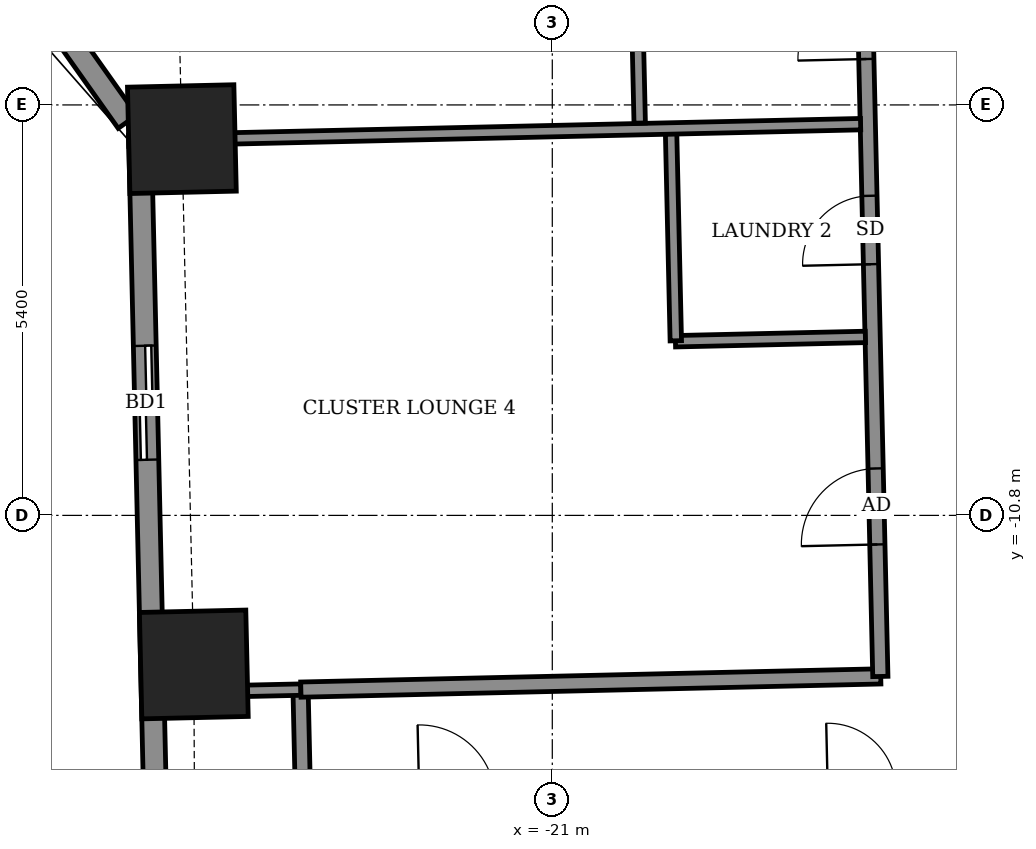
"""IFC4 building model, lengths in metres.
Left out: names, types, materials, properties, quantities, classifications, styles, units other than length and angle.
Written with IfcOpenShell. Run it as: python <this file> out.ifc"""

import sys

from ifc_helpers import new_model, si_unit, direction, frame, frame_2d, origin, origin_2d, place, context, subcontext, project, spatial, rectangle, extrude, element, fill, save


model = new_model("IFC4")
c1 = context("Model", 3, precision=1e-05, world=origin(), true_north=direction((0.0, 1.0)))
c2 = subcontext(c1, "Body", "Model", "MODEL_VIEW")
j1 = project(units=[si_unit("LENGTHUNIT", "METRE"), si_unit("PLANEANGLEUNIT", "RADIAN")], contexts=[c1])
p1 = place(None, origin())
s1 = spatial("IfcSite", under=j1, at=p1, CompositionType="ELEMENT")
p2 = place(p1, origin())
s2 = spatial("IfcBuilding", under=s1, at=p2, CompositionType="ELEMENT")
p3 = place(p2, frame((0.0, 0.0, 93.7)))
s3 = spatial("IfcBuildingStorey", under=s2, at=p3, CompositionType="ELEMENT", Elevation=93.7)
for number, where, z_axis, x_axis in (
    (1, (-25.873, -5.85, -0.55), (0.0, 0.0, 1.0), (0.023, -1.0, 0.0)),
    (2, (-25.716, -12.761, -0.55), (0.0, 0.0, 1.0), (0.023, -1.0, 0.0)),
):
    element("IfcColumn", number, at=place(p3, frame(where, z_axis=z_axis, x_axis=x_axis)), inside=s3, PredefinedType="COLUMN", context=c2, shape_type="SweptSolid", body=[
        extrude(rectangle(XDim=1.4, YDim=1.4, at=origin_2d()), origin(), (0.0, 0.0, 1.0), 3.6),
    ])
p4 = place(p3, frame((-28.651, -2.71, 0.0), z_axis=(0.0, 0.0, 1.0), x_axis=(0.577964171051, -0.816062140392, 0.0)))
e3 = element("IfcWall", 3, at=p4, inside=s3, PredefinedType="SOLIDWALL", context=c2, shape_type="SweptSolid", body=[
    extrude(rectangle(XDim=3.567, YDim=0.3, at=frame_2d((1.784, 0.0))), origin(), (0.0, 0.0, 1.0), 3.05),
])
p5 = place(p4, frame((0.337, 0.0, 0.9)))
e4 = element("IfcOpeningElement", 4, at=p5, cuts=e3, PredefinedType="OPENING", context=c2, shape_type="SweptSolid", body=[
    extrude(rectangle(XDim=1.2, YDim=1.5, at=frame_2d((0.6, 0.75))), frame((0.0, 0.16, 0.0), z_axis=(0.0, -1.0, 0.0), x_axis=(1.0, 0.0, 0.0)), (0.0, 0.0, 1.0), 0.32),
])
p6 = place(p3, frame((-26.424, -5.808, 0.0), z_axis=(0.0, 0.0, 1.0), x_axis=(0.022654755793, -0.999743348085, 0.0)))
e5 = element("IfcWall", 5, at=p6, inside=s3, PredefinedType="SOLIDWALL", context=c2, shape_type="SweptSolid", body=[
    extrude(rectangle(XDim=13.729, YDim=0.3, at=frame_2d((6.865, 0.0))), origin(), (0.0, 0.0, 1.0), 3.05),
])
p7 = place(p6, frame((2.761, 0.0, 0.0)))
e6 = element("IfcOpeningElement", 6, at=p7, cuts=e5, PredefinedType="OPENING", context=c2, shape_type="SweptSolid", body=[
    extrude(rectangle(XDim=1.5, YDim=2.4, at=frame_2d((0.75, 1.2))), frame((0.0, 0.16, 0.0), z_axis=(0.0, -1.0, 0.0), x_axis=(1.0, 0.0, 0.0)), (0.0, 0.0, 1.0), 0.32),
])
p8 = place(p6, frame((8.894, 0.0, 0.9)))
e7 = element("IfcOpeningElement", 7, at=p8, cuts=e5, PredefinedType="OPENING", context=c2, shape_type="SweptSolid", body=[
    extrude(rectangle(XDim=2.4, YDim=1.5, at=frame_2d((1.2, 0.75))), frame((0.0, 0.16, 0.0), z_axis=(0.0, -1.0, 0.0), x_axis=(1.0, 0.0, 0.0)), (0.0, 0.0, 1.0), 0.32),
])
p9 = place(p3, frame((-24.278, -14.591, 0.0), z_axis=(0.0, 0.0, 1.0), x_axis=(-0.022632637625, 0.99974384905, 0.0)))
e8 = element("IfcWall", 8, at=p9, inside=s3, PredefinedType="PARTITIONING", context=c2, shape_type="SweptSolid", body=[
    extrude(rectangle(XDim=1.5, YDim=0.2, at=frame_2d((0.75, 0.0))), origin(), (0.0, 0.0, 1.0), 3.05),
])
p10 = place(p3, frame((-24.274, -14.591, 0.0), z_axis=(0.0, 0.0, 1.0), x_axis=(0.999742718753, 0.022682510909, 0.0)))
e9 = element("IfcWall", 9, at=p10, inside=s3, PredefinedType="PARTITIONING", context=c2, shape_type="SweptSolid", body=[
    extrude(rectangle(XDim=52.471, YDim=0.2, at=frame_2d((26.236, 0.0))), origin(), (0.0, 0.0, 1.0), 3.05),
])
p11 = place(p10, frame((1.525, 0.0, 0.0)))
e10 = element("IfcOpeningElement", 10, at=p11, cuts=e9, PredefinedType="OPENING", context=c2, shape_type="SweptSolid", body=[
    extrude(rectangle(XDim=1.0, YDim=2.1, at=frame_2d((0.5, 1.05))), frame((0.0, 0.11, 0.0), z_axis=(0.0, -1.0, 0.0), x_axis=(1.0, 0.0, 0.0)), (0.0, 0.0, 1.0), 0.22),
])
p12 = place(p10, frame((6.9, 0.0, 0.0)))
e11 = element("IfcOpeningElement", 11, at=p12, cuts=e9, PredefinedType="OPENING", context=c2, shape_type="SweptSolid", body=[
    extrude(rectangle(XDim=0.9, YDim=2.1, at=frame_2d((0.45, 1.05))), frame((0.0, 0.11, 0.0), z_axis=(0.0, -1.0, 0.0), x_axis=(1.0, 0.0, 0.0)), (0.0, 0.0, 1.0), 0.22),
])
p13 = place(p10, frame((11.575, 0.0, 0.0)))
e12 = element("IfcOpeningElement", 12, at=p13, cuts=e9, PredefinedType="OPENING", context=c2, shape_type="SweptSolid", body=[
    extrude(rectangle(XDim=0.9, YDim=2.1, at=frame_2d((0.45, 1.05))), frame((0.0, 0.11, 0.0), z_axis=(0.0, -1.0, 0.0), x_axis=(1.0, 0.0, 0.0)), (0.0, 0.0, 1.0), 0.22),
])
p14 = place(p10, frame((13.6, 0.0, 0.0)))
e13 = element("IfcOpeningElement", 13, at=p14, cuts=e9, PredefinedType="OPENING", context=c2, shape_type="SweptSolid", body=[
    extrude(rectangle(XDim=0.9, YDim=2.1, at=frame_2d((0.45, 1.05))), frame((0.0, 0.11, 0.0), z_axis=(0.0, -1.0, 0.0), x_axis=(1.0, 0.0, 0.0)), (0.0, 0.0, 1.0), 0.22),
])
p15 = place(p10, frame((20.45, 0.0, 0.0)))
e14 = element("IfcOpeningElement", 14, at=p15, cuts=e9, PredefinedType="OPENING", context=c2, shape_type="SweptSolid", body=[
    extrude(rectangle(XDim=0.9, YDim=2.1, at=frame_2d((0.45, 1.05))), frame((0.0, 0.11, 0.0), z_axis=(0.0, -1.0, 0.0), x_axis=(1.0, 0.0, 0.0)), (0.0, 0.0, 1.0), 0.22),
])
p16 = place(p10, frame((22.6, 0.0, 0.0)))
e15 = element("IfcOpeningElement", 15, at=p16, cuts=e9, PredefinedType="OPENING", context=c2, shape_type="SweptSolid", body=[
    extrude(rectangle(XDim=0.9, YDim=2.1, at=frame_2d((0.45, 1.05))), frame((0.0, 0.11, 0.0), z_axis=(0.0, -1.0, 0.0), x_axis=(1.0, 0.0, 0.0)), (0.0, 0.0, 1.0), 0.22),
])
p17 = place(p10, frame((29.475, 0.0, 0.0)))
e16 = element("IfcOpeningElement", 16, at=p17, cuts=e9, PredefinedType="OPENING", context=c2, shape_type="SweptSolid", body=[
    extrude(rectangle(XDim=0.9, YDim=2.1, at=frame_2d((0.45, 1.05))), frame((0.0, 0.11, 0.0), z_axis=(0.0, -1.0, 0.0), x_axis=(1.0, 0.0, 0.0)), (0.0, 0.0, 1.0), 0.22),
])
p18 = place(p10, frame((31.675, 0.0, 0.0)))
e17 = element("IfcOpeningElement", 17, at=p18, cuts=e9, PredefinedType="OPENING", context=c2, shape_type="SweptSolid", body=[
    extrude(rectangle(XDim=0.9, YDim=2.1, at=frame_2d((0.45, 1.05))), frame((0.0, 0.11, 0.0), z_axis=(0.0, -1.0, 0.0), x_axis=(1.0, 0.0, 0.0)), (0.0, 0.0, 1.0), 0.22),
])
p19 = place(p10, frame((38.675, 0.0, 0.0)))
e18 = element("IfcOpeningElement", 18, at=p19, cuts=e9, PredefinedType="OPENING", context=c2, shape_type="SweptSolid", body=[
    extrude(rectangle(XDim=0.9, YDim=2.1, at=frame_2d((0.45, 1.05))), frame((0.0, 0.11, 0.0), z_axis=(0.0, -1.0, 0.0), x_axis=(1.0, 0.0, 0.0)), (0.0, 0.0, 1.0), 0.22),
])
p20 = place(p10, frame((40.675, 0.0, 0.0)))
e19 = element("IfcOpeningElement", 19, at=p20, cuts=e9, PredefinedType="OPENING", context=c2, shape_type="SweptSolid", body=[
    extrude(rectangle(XDim=0.9, YDim=2.1, at=frame_2d((0.45, 1.05))), frame((0.0, 0.11, 0.0), z_axis=(0.0, -1.0, 0.0), x_axis=(1.0, 0.0, 0.0)), (0.0, 0.0, 1.0), 0.22),
])
p21 = place(p10, frame((50.436, 0.0, 0.0)))
e20 = element("IfcOpeningElement", 20, at=p21, cuts=e9, PredefinedType="OPENING", context=c2, shape_type="SweptSolid", body=[
    extrude(rectangle(XDim=1.0, YDim=2.1, at=frame_2d((0.5, 1.05))), frame((0.0, 0.11, 0.0), z_axis=(0.0, -1.0, 0.0), x_axis=(1.0, 0.0, 0.0)), (0.0, 0.0, 1.0), 0.22),
])
p22 = place(p10, frame((45.45, 0.0, 0.0)))
e21 = element("IfcOpeningElement", 21, at=p22, cuts=e9, PredefinedType="OPENING", context=c2, shape_type="SweptSolid", body=[
    extrude(rectangle(XDim=0.9, YDim=2.1, at=frame_2d((0.45, 1.05))), frame((0.0, 0.11, 0.0), z_axis=(0.0, -1.0, 0.0), x_axis=(1.0, 0.0, 0.0)), (0.0, 0.0, 1.0), 0.22),
])
p23 = place(p3, frame((-26.108, -13.132, 0.0), z_axis=(0.0, 0.0, 1.0), x_axis=(0.999752642043, 0.022240834685, 0.0)))
e22 = element("IfcWall", 22, at=p23, inside=s3, PredefinedType="PARTITIONING", context=c2, shape_type="SweptSolid", body=[
    extrude(rectangle(XDim=1.8, YDim=0.15, at=frame_2d((0.9, 0.0))), origin(), (0.0, 0.0, 1.0), 3.05),
])
p24 = place(p3, frame((-24.308, -13.092, 0.0), z_axis=(0.0, 0.0, 1.0), x_axis=(0.999739800004, 0.022810793222, 0.0)))
e23 = element("IfcWall", 23, at=p24, inside=s3, PredefinedType="PARTITIONING", context=c2, shape_type="SweptSolid", body=[
    extrude(rectangle(XDim=7.631, YDim=0.2, at=frame_2d((3.815, 0.0))), origin(), (0.0, 0.0, 1.0), 3.05),
])
p25 = place(p3, frame((-16.684, -12.919, 0.0), z_axis=(0.0, 0.0, 1.0), x_axis=(-0.022706151961, 0.999742182097, 0.0)))
e24 = element("IfcWall", 24, at=p25, inside=s3, PredefinedType="PARTITIONING", context=c2, shape_type="SweptSolid", body=[
    extrude(rectangle(XDim=25.45, YDim=0.2, at=frame_2d((12.725, 0.0))), origin(), (0.0, 0.0, 1.0), 3.05),
])
p26 = place(p25, frame((23.938, 0.0, 0.0)))
e25 = element("IfcOpeningElement", 25, at=p26, cuts=e24, PredefinedType="OPENING", context=c2, shape_type="SweptSolid", body=[
    extrude(rectangle(XDim=1.0, YDim=2.1, at=frame_2d((0.5, 1.05))), frame((0.0, 0.11, 0.0), z_axis=(0.0, -1.0, 0.0), x_axis=(1.0, 0.0, 0.0)), (0.0, 0.0, 1.0), 0.22),
])
p27 = place(p25, frame((21.775, 0.0, 0.0)))
e26 = element("IfcOpeningElement", 26, at=p27, cuts=e24, PredefinedType="OPENING", context=c2, shape_type="SweptSolid", body=[
    extrude(rectangle(XDim=0.9, YDim=2.1, at=frame_2d((0.45, 1.05))), frame((0.0, 0.11, 0.0), z_axis=(0.0, -1.0, 0.0), x_axis=(1.0, 0.0, 0.0)), (0.0, 0.0, 1.0), 0.22),
])
p28 = place(p25, frame((16.975, 0.0, 0.0)))
e27 = element("IfcOpeningElement", 27, at=p28, cuts=e24, PredefinedType="OPENING", context=c2, shape_type="SweptSolid", body=[
    extrude(rectangle(XDim=1.0, YDim=2.1, at=frame_2d((0.5, 1.05))), frame((0.0, 0.11, 0.0), z_axis=(0.0, -1.0, 0.0), x_axis=(1.0, 0.0, 0.0)), (0.0, 0.0, 1.0), 0.22),
])
p29 = place(p25, frame((19.275, 0.0, 0.0)))
e28 = element("IfcOpeningElement", 28, at=p29, cuts=e24, PredefinedType="OPENING", context=c2, shape_type="SweptSolid", body=[
    extrude(rectangle(XDim=0.9, YDim=2.1, at=frame_2d((0.45, 1.05))), frame((0.0, 0.11, 0.0), z_axis=(0.0, -1.0, 0.0), x_axis=(1.0, 0.0, 0.0)), (0.0, 0.0, 1.0), 0.22),
])
p30 = place(p25, frame((15.075, 0.0, 0.0)))
e29 = element("IfcOpeningElement", 29, at=p30, cuts=e24, PredefinedType="OPENING", context=c2, shape_type="SweptSolid", body=[
    extrude(rectangle(XDim=1.0, YDim=2.1, at=frame_2d((0.5, 1.05))), frame((0.0, 0.11, 0.0), z_axis=(0.0, -1.0, 0.0), x_axis=(1.0, 0.0, 0.0)), (0.0, 0.0, 1.0), 0.22),
])
p31 = place(p25, frame((12.975, 0.0, 0.0)))
e30 = element("IfcOpeningElement", 30, at=p31, cuts=e24, PredefinedType="OPENING", context=c2, shape_type="SweptSolid", body=[
    extrude(rectangle(XDim=0.9, YDim=2.1, at=frame_2d((0.45, 1.05))), frame((0.0, 0.11, 0.0), z_axis=(0.0, -1.0, 0.0), x_axis=(1.0, 0.0, 0.0)), (0.0, 0.0, 1.0), 0.22),
])
p32 = place(p25, frame((10.55, 0.0, 0.0)))
e31 = element("IfcOpeningElement", 31, at=p32, cuts=e24, PredefinedType="OPENING", context=c2, shape_type="SweptSolid", body=[
    extrude(rectangle(XDim=1.0, YDim=2.1, at=frame_2d((0.5, 1.05))), frame((0.0, 0.11, 0.0), z_axis=(0.0, -1.0, 0.0), x_axis=(1.0, 0.0, 0.0)), (0.0, 0.0, 1.0), 0.22),
])
p33 = place(p25, frame((8.125, 0.0, 0.0)))
e32 = element("IfcOpeningElement", 32, at=p33, cuts=e24, PredefinedType="OPENING", context=c2, shape_type="SweptSolid", body=[
    extrude(rectangle(XDim=0.9, YDim=2.1, at=frame_2d((0.45, 1.05))), frame((0.0, 0.11, 0.0), z_axis=(0.0, -1.0, 0.0), x_axis=(1.0, 0.0, 0.0)), (0.0, 0.0, 1.0), 0.22),
])
p34 = place(p25, frame((1.737, 0.0, 0.0)))
e33 = element("IfcOpeningElement", 33, at=p34, cuts=e24, PredefinedType="OPENING", context=c2, shape_type="SweptSolid", body=[
    extrude(rectangle(XDim=1.0, YDim=2.1, at=frame_2d((0.5, 1.05))), frame((0.0, 0.11, 0.0), z_axis=(0.0, -1.0, 0.0), x_axis=(1.0, 0.0, 0.0)), (0.0, 0.0, 1.0), 0.22),
])
p35 = place(p25, frame((5.425, 0.0, 0.0)))
e34 = element("IfcOpeningElement", 34, at=p35, cuts=e24, PredefinedType="OPENING", context=c2, shape_type="SweptSolid", body=[
    extrude(rectangle(XDim=0.9, YDim=2.1, at=frame_2d((0.45, 1.05))), frame((0.0, 0.11, 0.0), z_axis=(0.0, -1.0, 0.0), x_axis=(1.0, 0.0, 0.0)), (0.0, 0.0, 1.0), 0.22),
])
p36 = place(p3, frame((-19.38, -8.509, 0.0), z_axis=(0.0, 0.0, 1.0), x_axis=(0.999738750294, 0.02285675306, 0.0)))
e35 = element("IfcWall", 35, at=p36, inside=s3, PredefinedType="PARTITIONING", context=c2, shape_type="SweptSolid", body=[
    extrude(rectangle(XDim=2.5, YDim=0.15, at=frame_2d((1.25, 0.0))), origin(), (0.0, 0.0, 1.0), 3.05),
])
p37 = place(p3, frame((-19.375, -8.503, 0.0), z_axis=(0.0, 0.0, 1.0), x_axis=(-0.022760079124, 0.999740955847, 0.0)))
e36 = element("IfcWall", 36, at=p37, inside=s3, PredefinedType="PARTITIONING", context=c2, shape_type="SweptSolid", body=[
    extrude(rectangle(XDim=2.725, YDim=0.15, at=frame_2d((1.362, 0.0))), origin(), (0.0, 0.0, 1.0), 3.05),
])
p38 = place(p3, frame((-26.573, -5.871, 0.0), z_axis=(0.0, 0.0, 1.0), x_axis=(0.999743768709, 0.022636186244, 0.0)))
e37 = element("IfcWall", 37, at=p38, inside=s3, PredefinedType="PARTITIONING", context=c2, shape_type="SweptSolid", body=[
    extrude(rectangle(XDim=9.631, YDim=0.15, at=frame_2d((4.816, 0.0))), origin(), (0.0, 0.0, 1.0), 3.05),
])
p39 = place(p3, frame((-19.85, -5.639, 0.0), z_axis=(0.0, 0.0, 1.0), x_axis=(-0.022523775833, 0.999746307581, 0.0)))
e38 = element("IfcWall", 38, at=p39, inside=s3, PredefinedType="PARTITIONING", context=c2, shape_type="SweptSolid", body=[
    extrude(rectangle(XDim=2.526, YDim=0.15, at=frame_2d((1.263, 0.0))), origin(), (0.0, 0.0, 1.0), 3.05),
])
p40 = place(p7, origin())
e39 = element("IfcDoor", 39, at=p40, inside=s3, OperationType="SLIDING_TO_LEFT", PredefinedType="DOOR", context=c2, shape_type="SweptSolid", body=[
    extrude(rectangle(XDim=1.5, YDim=2.4, at=frame_2d((0.75, 1.2))), frame((0.0, 0.025, 0.0), z_axis=(0.0, -1.0, 0.0), x_axis=(1.0, 0.0, 0.0)), (0.0, 0.0, 1.0), 0.05),
])
fill(e6, e39)
p41 = place(p33, origin())
e40 = element("IfcDoor", 40, at=p41, inside=s3, OperationType="SINGLE_SWING_RIGHT", PredefinedType="DOOR", context=c2, shape_type="SweptSolid", body=[
    extrude(rectangle(XDim=0.9, YDim=2.1, at=frame_2d((0.45, 1.05))), frame((0.0, 0.025, 0.0), z_axis=(0.0, -1.0, 0.0), x_axis=(1.0, 0.0, 0.0)), (0.0, 0.0, 1.0), 0.05),
])
fill(e32, e40)
p42 = place(p34, origin())
e41 = element("IfcDoor", 41, at=p42, inside=s3, OperationType="SINGLE_SWING_LEFT", PredefinedType="DOOR", context=c2, shape_type="SweptSolid", body=[
    extrude(rectangle(XDim=1.0, YDim=2.1, at=frame_2d((0.5, 1.05))), frame((0.0, 0.025, 0.0), z_axis=(0.0, -1.0, 0.0), x_axis=(1.0, 0.0, 0.0)), (0.0, 0.0, 1.0), 0.05),
])
fill(e33, e41)
p43 = place(p35, origin())
e42 = element("IfcDoor", 42, at=p43, inside=s3, OperationType="SINGLE_SWING_LEFT", PredefinedType="DOOR", context=c2, shape_type="SweptSolid", body=[
    extrude(rectangle(XDim=0.9, YDim=2.1, at=frame_2d((0.45, 1.05))), frame((0.0, 0.025, 0.0), z_axis=(0.0, -1.0, 0.0), x_axis=(1.0, 0.0, 0.0)), (0.0, 0.0, 1.0), 0.05),
])
fill(e34, e42)
save(model, sys.argv[1])
